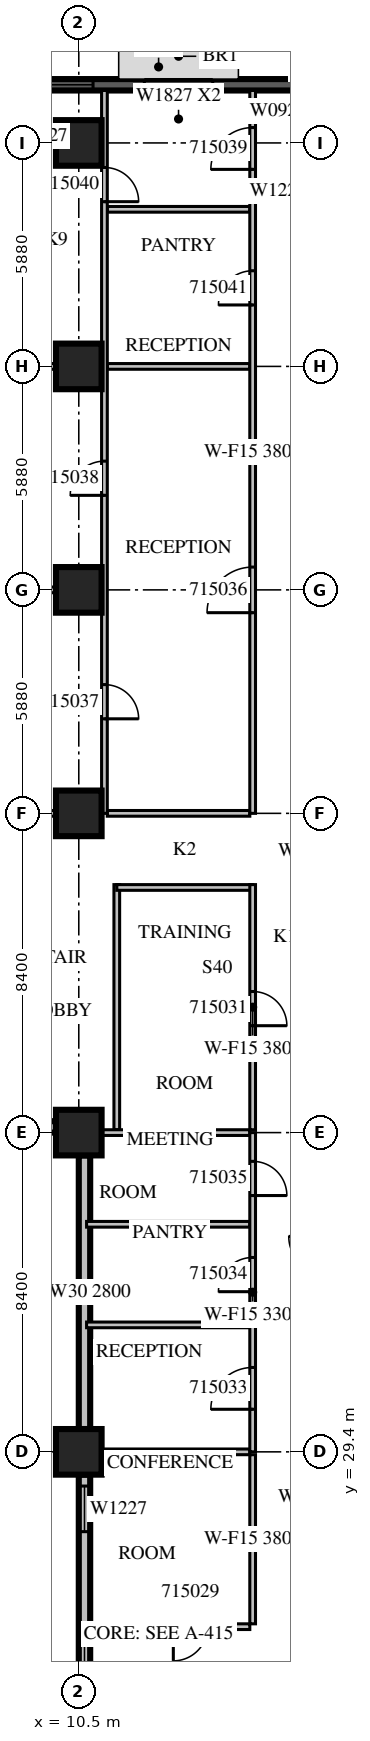
"""IFC4 building model, lengths in metres.
Left out: names, types, materials, properties, quantities, classifications, styles, units other than length and angle.
Written with IfcOpenShell. Run it as: python <this file> out.ifc"""

import sys

from ifc_helpers import new_model, si_unit, direction, frame, frame_2d, origin, origin_2d, place, context, subcontext, project, spatial, rectangle, extrude, source, transform, mapped, element, fill, save


model = new_model("IFC4")
c1 = context("Model", 3, precision=1e-05, world=origin(), true_north=direction((0.0, 1.0)))
c2 = subcontext(c1, "Body", "Model", "MODEL_VIEW")
j1 = project(units=[si_unit("LENGTHUNIT", "METRE"), si_unit("PLANEANGLEUNIT", "RADIAN")], contexts=[c1])
p1 = place(None, origin())
s1 = spatial("IfcSite", under=j1, at=p1, CompositionType="ELEMENT")
p2 = place(p1, origin())
s2 = spatial("IfcBuilding", under=s1, at=p2, CompositionType="ELEMENT")
p3 = place(p2, frame((0.0, 0.0, 74.1)))
s3 = spatial("IfcBuildingStorey", under=s2, at=p3, CompositionType="ELEMENT", Elevation=74.1)
m1 = source(origin(), c2, "Body", "SweptSolid", [
    extrude(rectangle(XDim=1.2, YDim=1.2, at=origin_2d()), origin(), (0.0, 0.0, 1.0), 4.2),
])
for number, where, z_axis, x_axis in (
    (1, (10.5, 29.4, 0.0), (0.0, 0.0, 1.0), (1.0, 0.0, 0.0)),
    (2, (10.5, 37.8, 0.0), (0.0, 0.0, 1.0), (1.0, 0.0, 0.0)),
    (3, (10.5, 46.2, 0.0), (0.0, 0.0, 1.0), (1.0, 0.0, 0.0)),
    (4, (10.5, 52.08, 0.0), (0.0, 0.0, 1.0), (1.0, 0.0, 0.0)),
    (5, (10.5, 57.96, 0.0), (0.0, 0.0, 1.0), (1.0, 0.0, 0.0)),
    (6, (10.5, 63.84, 0.0), (0.0, 0.0, 1.0), (1.0, 0.0, 0.0)),
):
    element("IfcColumn", number, at=place(p3, frame(where, z_axis=z_axis, x_axis=x_axis)), inside=s3, PredefinedType="COLUMN", context=c2, shape_type="MappedRepresentation", body=[
        mapped(m1, transform((0.0, 0.0, 0.0), scale=1.0)),
    ])
m2 = source(origin(), c2, "Body", "SweptSolid", [
    extrude(rectangle(XDim=8.4, YDim=0.3, at=frame_2d((4.2, 0.0))), origin(), (0.0, 0.0, 1.0), 3.8),
])
p4 = place(p3, frame((16.8, 65.37, 0.0), z_axis=(0.0, 0.0, 1.0), x_axis=(-1.0, 0.0, 0.0)))
e7 = element("IfcWall", 7, at=p4, inside=s3, PredefinedType="SOLIDWALL", context=c2, shape_type="MappedRepresentation", body=[
    mapped(m2, transform((0.0, 0.0, 0.0), scale=1.0)),
])
m3 = source(origin(), c2, "Body", "SweptSolid", [
    extrude(rectangle(XDim=1.8, YDim=2.7, at=frame_2d((0.9, 1.35))), frame((0.0, 0.16, 0.0), z_axis=(0.0, -1.0, 0.0), x_axis=(1.0, 0.0, 0.0)), (0.0, 0.0, 1.0), 0.32),
])
p5 = place(p4, frame((2.775, 0.0, 0.6)))
e8 = element("IfcOpeningElement", 8, at=p5, cuts=e7, PredefinedType="OPENING", context=c2, shape_type="MappedRepresentation", body=[
    mapped(m3, transform((0.0, 0.0, 0.0), scale=1.0)),
])
p6 = place(p4, frame((5.925, 0.0, 0.6)))
e9 = element("IfcOpeningElement", 9, at=p6, cuts=e7, PredefinedType="OPENING", context=c2, shape_type="MappedRepresentation", body=[
    mapped(m3, transform((0.0, 0.0, 0.0), scale=1.0)),
])
m4 = source(origin(), c2, "Body", "SweptSolid", [
    extrude(rectangle(XDim=8.7, YDim=0.3, at=frame_2d((4.35, 0.0))), origin(), (0.0, 0.0, 1.0), 3.8),
])
p7 = place(p3, frame((1.2, 37.95, 0.0), z_axis=(0.0, 0.0, 1.0), x_axis=(1.0, 0.0, 0.0)))
e10 = element("IfcWall", 10, at=p7, inside=s3, PredefinedType="STANDARD", context=c2, shape_type="MappedRepresentation", body=[
    mapped(m4, transform((0.0, 0.0, 0.0), scale=1.0)),
])
m5 = source(origin(), c2, "Body", "SweptSolid", [
    extrude(rectangle(XDim=2.4, YDim=2.7, at=frame_2d((1.2, 1.35))), frame((0.0, 0.16, 0.0), z_axis=(0.0, -1.0, 0.0), x_axis=(1.0, 0.0, 0.0)), (0.0, 0.0, 1.0), 0.32),
])
p8 = place(p7, frame((0.225, 0.0, 0.6)))
e11 = element("IfcOpeningElement", 11, at=p8, cuts=e10, PredefinedType="OPENING", context=c2, shape_type="MappedRepresentation", body=[
    mapped(m5, transform((0.0, 0.0, 0.0), scale=1.0)),
])
p9 = place(p7, frame((5.088, 0.0, 0.6)))
e12 = element("IfcOpeningElement", 12, at=p9, cuts=e10, PredefinedType="OPENING", context=c2, shape_type="MappedRepresentation", body=[
    mapped(m3, transform((0.0, 0.0, 0.0), scale=1.0)),
])
m6 = source(origin(), c2, "Body", "SweptSolid", [
    extrude(rectangle(XDim=7.2, YDim=0.3, at=frame_2d((3.6, 0.0))), origin(), (0.0, 0.0, 1.0), 2.8),
])
p10 = place(p3, frame((10.65, 37.2, 0.0), z_axis=(0.0, 0.0, 1.0), x_axis=(0.0, -1.0, 0.0)))
e13 = element("IfcWall", 13, at=p10, inside=s3, PredefinedType="STANDARD", context=c2, shape_type="MappedRepresentation", body=[
    mapped(m6, transform((0.0, 0.0, 0.0), scale=1.0)),
])
m7 = source(origin(), c2, "Body", "SweptSolid", [
    extrude(rectangle(XDim=6.6, YDim=0.3, at=frame_2d((3.3, 0.0))), origin(), (0.0, 0.0, 1.0), 3.8),
])
p11 = place(p3, frame((10.65, 28.8, 0.0), z_axis=(0.0, 0.0, 1.0), x_axis=(0.0, -1.0, 0.0)))
e14 = element("IfcWall", 14, at=p11, inside=s3, PredefinedType="STANDARD", context=c2, shape_type="MappedRepresentation", body=[
    mapped(m7, transform((0.0, 0.0, 0.0), scale=1.0)),
])
m8 = source(origin(), c2, "Body", "SweptSolid", [
    extrude(rectangle(XDim=1.2, YDim=2.7, at=frame_2d((0.6, 1.35))), frame((0.0, 0.16, 0.0), z_axis=(0.0, -1.0, 0.0), x_axis=(1.0, 0.0, 0.0)), (0.0, 0.0, 1.0), 0.32),
])
p12 = place(p11, frame((0.3, 0.0, 0.6)))
e15 = element("IfcOpeningElement", 15, at=p12, cuts=e14, PredefinedType="OPENING", context=c2, shape_type="MappedRepresentation", body=[
    mapped(m8, transform((0.0, 0.0, 0.0), scale=1.0)),
])
p13 = place(p11, frame((4.338, 0.0, 0.6)))
e16 = element("IfcOpeningElement", 16, at=p13, cuts=e14, PredefinedType="OPENING", context=c2, shape_type="MappedRepresentation", body=[
    mapped(m3, transform((0.0, 0.0, 0.0), scale=1.0)),
])
m9 = source(origin(), c2, "Body", "SweptSolid", [
    extrude(rectangle(XDim=4.295, YDim=0.15, at=frame_2d((2.147, 0.0))), origin(), (0.0, 0.0, 1.0), 3.8),
])
p14 = place(p3, frame((10.705, 24.8, 0.0), z_axis=(0.0, 0.0, 1.0), x_axis=(1.0, 0.0, 0.0)))
e17 = element("IfcWall", 17, at=p14, inside=s3, PredefinedType="PARTITIONING", context=c2, shape_type="MappedRepresentation", body=[
    mapped(m9, transform((0.0, 0.0, 0.0), scale=1.0)),
])
m10 = source(origin(), c2, "Body", "SweptSolid", [
    extrude(rectangle(XDim=0.9, YDim=2.1, at=frame_2d((0.45, 1.05))), frame((0.0, 0.085, 0.0), z_axis=(0.0, -1.0, 0.0), x_axis=(1.0, 0.0, 0.0)), (0.0, 0.0, 1.0), 0.17),
])
p15 = place(p14, frame((2.283, 0.0, 0.0)))
e18 = element("IfcOpeningElement", 18, at=p15, cuts=e17, PredefinedType="OPENING", context=c2, shape_type="MappedRepresentation", body=[
    mapped(m10, transform((0.0, 0.0, 0.0), scale=1.0)),
])
m11 = source(origin(), c2, "Body", "SweptSolid", [
    extrude(rectangle(XDim=4.45, YDim=0.15, at=frame_2d((2.225, 0.0))), origin(), (0.0, 0.0, 1.0), 3.8),
])
p16 = place(p3, frame((15.075, 24.875, 0.0), z_axis=(0.0, 0.0, 1.0), x_axis=(0.0, 1.0, 0.0)))
e19 = element("IfcWall", 19, at=p16, inside=s3, PredefinedType="PARTITIONING", context=c2, shape_type="MappedRepresentation", body=[
    mapped(m11, transform((0.0, 0.0, 0.0), scale=1.0)),
])
m12 = source(origin(), c2, "Body", "SweptSolid", [
    extrude(rectangle(XDim=3.901, YDim=0.15, at=frame_2d((1.95, 0.0))), origin(), (0.0, 0.0, 1.0), 3.8),
])
p17 = place(p3, frame((15.0, 29.4, 0.0), z_axis=(0.0, 0.0, 1.0), x_axis=(-1.0, 0.0, 0.0)))
e20 = element("IfcWall", 20, at=p17, inside=s3, PredefinedType="PARTITIONING", context=c2, shape_type="MappedRepresentation", body=[
    mapped(m12, transform((0.0, 0.0, 0.0), scale=1.0)),
])
m13 = source(origin(), c2, "Body", "SweptSolid", [
    extrude(rectangle(XDim=6.45, YDim=0.15, at=frame_2d((3.225, 0.0))), origin(), (0.0, 0.0, 1.0), 3.8),
])
p18 = place(p3, frame((11.5, 44.325, 0.0), z_axis=(0.0, 0.0, 1.0), x_axis=(0.0, -1.0, 0.0)))
e21 = element("IfcWall", 21, at=p18, inside=s3, PredefinedType="PARTITIONING", context=c2, shape_type="MappedRepresentation", body=[
    mapped(m13, transform((0.0, 0.0, 0.0), scale=1.0)),
])
m14 = source(origin(), c2, "Body", "SweptSolid", [
    extrude(rectangle(XDim=3.575, YDim=0.15, at=frame_2d((1.788, 0.0))), origin(), (0.0, 0.0, 1.0), 3.8),
])
p19 = place(p3, frame((15.075, 44.25, 0.0), z_axis=(0.0, 0.0, 1.0), x_axis=(-1.0, 0.0, 0.0)))
e22 = element("IfcWall", 22, at=p19, inside=s3, PredefinedType="PARTITIONING", context=c2, shape_type="MappedRepresentation", body=[
    mapped(m14, transform((0.0, 0.0, 0.0), scale=1.0)),
])
p20 = place(p3, frame((15.075, 37.875, 0.0), z_axis=(0.0, 0.0, 1.0), x_axis=(0.0, 1.0, 0.0)))
e23 = element("IfcWall", 23, at=p20, inside=s3, PredefinedType="PARTITIONING", context=c2, shape_type="MappedRepresentation", body=[
    mapped(m13, transform((0.0, 0.0, 0.0), scale=1.0)),
])
p21 = place(p20, frame((2.737, 0.0, 0.0)))
e24 = element("IfcOpeningElement", 24, at=p21, cuts=e23, PredefinedType="OPENING", context=c2, shape_type="MappedRepresentation", body=[
    mapped(m10, transform((0.0, 0.0, 0.0), scale=1.0)),
])
for number, where, z_axis, x_axis in (
    (25, (15.0, 32.74, 0.0), (0.0, 0.0, 1.0), (-1.0, 0.0, 0.0)),
    (26, (15.0, 35.388, 0.0), (0.0, 0.0, 1.0), (-1.0, 0.0, 0.0)),
):
    element("IfcWall", number, at=place(p3, frame(where, z_axis=z_axis, x_axis=x_axis)), inside=s3, PredefinedType="PARTITIONING", context=c2, shape_type="MappedRepresentation", body=[
        mapped(m9, transform((0.0, 0.0, 0.0), scale=1.0)),
    ])
p22 = place(p3, frame((15.0, 37.8, 0.0), z_axis=(0.0, 0.0, 1.0), x_axis=(-1.0, 0.0, 0.0)))
e27 = element("IfcWall", 27, at=p22, inside=s3, PredefinedType="PARTITIONING", context=c2, shape_type="MappedRepresentation", body=[
    mapped(m12, transform((0.0, 0.0, 0.0), scale=1.0)),
])
m15 = source(origin(), c2, "Body", "SweptSolid", [
    extrude(rectangle(XDim=8.702, YDim=0.15, at=frame_2d((4.351, 0.0))), origin(), (0.0, 0.0, 1.0), 3.8),
])
p23 = place(p3, frame((9.901, 52.08, 0.0), z_axis=(0.0, 0.0, 1.0), x_axis=(-1.0, 0.0, 0.0)))
e28 = element("IfcWall", 28, at=p23, inside=s3, PredefinedType="PARTITIONING", context=c2, shape_type="MappedRepresentation", body=[
    mapped(m15, transform((0.0, 0.0, 0.0), scale=1.0)),
])
m16 = source(origin(), c2, "Body", "SweptSolid", [
    extrude(rectangle(XDim=3.75, YDim=0.15, at=frame_2d((1.875, 0.0))), origin(), (0.0, 0.0, 1.0), 3.8),
])
p24 = place(p3, frame((15.0, 62.093, 0.0), z_axis=(0.0, 0.0, 1.0), x_axis=(-1.0, 0.0, 0.0)))
e29 = element("IfcWall", 29, at=p24, inside=s3, PredefinedType="PARTITIONING", context=c2, shape_type="MappedRepresentation", body=[
    mapped(m16, transform((0.0, 0.0, 0.0), scale=1.0)),
])
p25 = place(p3, frame((9.901, 46.2, 0.0), z_axis=(0.0, 0.0, 1.0), x_axis=(-1.0, 0.0, 0.0)))
e30 = element("IfcWall", 30, at=p25, inside=s3, PredefinedType="PARTITIONING", context=c2, shape_type="MappedRepresentation", body=[
    mapped(m15, transform((0.0, 0.0, 0.0), scale=1.0)),
])
p26 = place(p3, frame((15.0, 46.2, 0.0), z_axis=(0.0, 0.0, 1.0), x_axis=(-1.0, 0.0, 0.0)))
e31 = element("IfcWall", 31, at=p26, inside=s3, PredefinedType="PARTITIONING", context=c2, shape_type="MappedRepresentation", body=[
    mapped(m16, transform((0.0, 0.0, 0.0), scale=1.0)),
])
p27 = place(p3, frame((9.901, 57.96, 0.0), z_axis=(0.0, 0.0, 1.0), x_axis=(-1.0, 0.0, 0.0)))
e32 = element("IfcWall", 32, at=p27, inside=s3, PredefinedType="PARTITIONING", context=c2, shape_type="MappedRepresentation", body=[
    mapped(m15, transform((0.0, 0.0, 0.0), scale=1.0)),
])
p28 = place(p3, frame((15.0, 57.96, 0.0), z_axis=(0.0, 0.0, 1.0), x_axis=(-1.0, 0.0, 0.0)))
e33 = element("IfcWall", 33, at=p28, inside=s3, PredefinedType="PARTITIONING", context=c2, shape_type="MappedRepresentation", body=[
    mapped(m16, transform((0.0, 0.0, 0.0), scale=1.0)),
])
m17 = source(origin(), c2, "Body", "SweptSolid", [
    extrude(rectangle(XDim=19.02, YDim=0.15, at=frame_2d((9.51, 0.0))), origin(), (0.0, 0.0, 1.0), 3.8),
])
p29 = place(p3, frame((11.175, 46.2, 0.0), z_axis=(0.0, 0.0, 1.0), x_axis=(0.0, 1.0, 0.0)))
e34 = element("IfcWall", 34, at=p29, inside=s3, PredefinedType="PARTITIONING", context=c2, shape_type="MappedRepresentation", body=[
    mapped(m17, transform((0.0, 0.0, 0.0), scale=1.0)),
])
p30 = place(p29, frame((2.487, 0.0, 0.0)))
e35 = element("IfcOpeningElement", 35, at=p30, cuts=e34, PredefinedType="OPENING", context=c2, shape_type="MappedRepresentation", body=[
    mapped(m10, transform((0.0, 0.0, 0.0), scale=1.0)),
])
p31 = place(p29, frame((8.367, 0.0, 0.0)))
e36 = element("IfcOpeningElement", 36, at=p31, cuts=e34, PredefinedType="OPENING", context=c2, shape_type="MappedRepresentation", body=[
    mapped(m10, transform((0.0, 0.0, 0.0), scale=1.0)),
])
p32 = place(p29, frame((16.094, 0.0, 0.0)))
e37 = element("IfcOpeningElement", 37, at=p32, cuts=e34, PredefinedType="OPENING", context=c2, shape_type="MappedRepresentation", body=[
    mapped(m10, transform((0.0, 0.0, 0.0), scale=1.0)),
])
m18 = source(origin(), c2, "Body", "SweptSolid", [
    extrude(rectangle(XDim=8.4, YDim=0.15, at=frame_2d((4.2, 0.0))), origin(), (0.0, 0.0, 1.0), 3.3),
])
p33 = place(p3, frame((15.075, 29.4, 0.0), z_axis=(0.0, 0.0, 1.0), x_axis=(0.0, 1.0, 0.0)))
e38 = element("IfcWall", 38, at=p33, inside=s3, PredefinedType="PARTITIONING", context=c2, shape_type="MappedRepresentation", body=[
    mapped(m18, transform((0.0, 0.0, 0.0), scale=1.0)),
])
m19 = source(origin(), c2, "Body", "SweptSolid", [
    extrude(rectangle(XDim=1.1, YDim=2.1, at=frame_2d((0.55, 1.05))), frame((0.0, 0.085, 0.0), z_axis=(0.0, -1.0, 0.0), x_axis=(1.0, 0.0, 0.0)), (0.0, 0.0, 1.0), 0.17),
])
p34 = place(p33, frame((1.12, 0.0, 0.0)))
e39 = element("IfcOpeningElement", 39, at=p34, cuts=e38, PredefinedType="OPENING", context=c2, shape_type="MappedRepresentation", body=[
    mapped(m19, transform((0.0, 0.0, 0.0), scale=1.0)),
])
p35 = place(p33, frame((4.214, 0.0, 0.0)))
e40 = element("IfcOpeningElement", 40, at=p35, cuts=e38, PredefinedType="OPENING", context=c2, shape_type="MappedRepresentation", body=[
    mapped(m10, transform((0.0, 0.0, 0.0), scale=1.0)),
])
p36 = place(p33, frame((6.744, 0.0, 0.0)))
e41 = element("IfcOpeningElement", 41, at=p36, cuts=e38, PredefinedType="OPENING", context=c2, shape_type="MappedRepresentation", body=[
    mapped(m10, transform((0.0, 0.0, 0.0), scale=1.0)),
])
p37 = place(p3, frame((15.075, 46.2, 0.0), z_axis=(0.0, 0.0, 1.0), x_axis=(0.0, 1.0, 0.0)))
e42 = element("IfcWall", 42, at=p37, inside=s3, PredefinedType="PARTITIONING", context=c2, shape_type="MappedRepresentation", body=[
    mapped(m17, transform((0.0, 0.0, 0.0), scale=1.0)),
])
m20 = source(origin(), c2, "Body", "SweptSolid", [
    extrude(rectangle(XDim=1.2, YDim=2.1, at=frame_2d((0.6, 1.05))), frame((0.0, 0.085, 0.0), z_axis=(0.0, -1.0, 0.0), x_axis=(1.0, 0.0, 0.0)), (0.0, 0.0, 1.0), 0.17),
])
p38 = place(p37, frame((5.28, 0.0, 0.0)))
e43 = element("IfcOpeningElement", 43, at=p38, cuts=e42, PredefinedType="OPENING", context=c2, shape_type="MappedRepresentation", body=[
    mapped(m20, transform((0.0, 0.0, 0.0), scale=1.0)),
])
p39 = place(p37, frame((16.944, 0.0, 0.0)))
e44 = element("IfcOpeningElement", 44, at=p39, cuts=e42, PredefinedType="OPENING", context=c2, shape_type="MappedRepresentation", body=[
    mapped(m19, transform((0.0, 0.0, 0.0), scale=1.0)),
])
p40 = place(p37, frame((13.377, 0.0, 0.0)))
e45 = element("IfcOpeningElement", 45, at=p40, cuts=e42, PredefinedType="OPENING", context=c2, shape_type="MappedRepresentation", body=[
    mapped(m10, transform((0.0, 0.0, 0.0), scale=1.0)),
])
m21 = source(origin(), c2, "Body", "SweptSolid", [
    extrude(rectangle(XDim=1.8, YDim=2.7, at=frame_2d((0.9, 1.35))), frame((0.0, 0.03, 0.0), z_axis=(0.0, -1.0, 0.0), x_axis=(1.0, 0.0, 0.0)), (0.0, 0.0, 1.0), 0.06),
])
p41 = place(p5, origin())
e46 = element("IfcWindow", 46, at=p41, inside=s3, PartitioningType="SINGLE_PANEL", PredefinedType="WINDOW", context=c2, shape_type="MappedRepresentation", body=[
    mapped(m21, transform((0.0, 0.0, 0.0), scale=1.0)),
])
fill(e8, e46)
p42 = place(p6, origin())
e47 = element("IfcWindow", 47, at=p42, inside=s3, PartitioningType="SINGLE_PANEL", PredefinedType="WINDOW", context=c2, shape_type="MappedRepresentation", body=[
    mapped(m21, transform((0.0, 0.0, 0.0), scale=1.0)),
])
fill(e9, e47)
m22 = source(origin(), c2, "Body", "SweptSolid", [
    extrude(rectangle(XDim=1.2, YDim=2.7, at=frame_2d((0.6, 1.35))), frame((0.0, 0.03, 0.0), z_axis=(0.0, -1.0, 0.0), x_axis=(1.0, 0.0, 0.0)), (0.0, 0.0, 1.0), 0.06),
])
p43 = place(p12, origin())
e48 = element("IfcWindow", 48, at=p43, inside=s3, PartitioningType="SINGLE_PANEL", PredefinedType="WINDOW", context=c2, shape_type="MappedRepresentation", body=[
    mapped(m22, transform((0.0, 0.0, 0.0), scale=1.0)),
])
fill(e15, e48)
p44 = place(p13, origin())
e49 = element("IfcWindow", 49, at=p44, inside=s3, PartitioningType="SINGLE_PANEL", PredefinedType="WINDOW", context=c2, shape_type="MappedRepresentation", body=[
    mapped(m21, transform((0.0, 0.0, 0.0), scale=1.0)),
])
fill(e16, e49)
m23 = source(origin(), c2, "Body", "SweptSolid", [
    extrude(rectangle(XDim=0.9, YDim=2.1, at=frame_2d((0.45, 1.05))), frame((0.0, 0.025, 0.0), z_axis=(0.0, -1.0, 0.0), x_axis=(1.0, 0.0, 0.0)), (0.0, 0.0, 1.0), 0.05),
])
p45 = place(p15, origin())
e50 = element("IfcDoor", 50, at=p45, inside=s3, OperationType="SINGLE_SWING_RIGHT", PredefinedType="DOOR", context=c2, shape_type="MappedRepresentation", body=[
    mapped(m23, transform((0.0, 0.0, 0.0), scale=1.0)),
])
fill(e18, e50)
p46 = place(p21, origin())
e51 = element("IfcDoor", 51, at=p46, inside=s3, OperationType="SINGLE_SWING_RIGHT", PredefinedType="DOOR", context=c2, shape_type="MappedRepresentation", body=[
    mapped(m23, transform((0.0, 0.0, 0.0), scale=1.0)),
])
fill(e24, e51)
m24 = source(origin(), c2, "Body", "SweptSolid", [
    extrude(rectangle(XDim=1.1, YDim=2.1, at=frame_2d((0.55, 1.05))), frame((0.0, 0.025, 0.0), z_axis=(0.0, -1.0, 0.0), x_axis=(1.0, 0.0, 0.0)), (0.0, 0.0, 1.0), 0.05),
])
p47 = place(p34, origin())
e52 = element("IfcDoor", 52, at=p47, inside=s3, OperationType="SINGLE_SWING_LEFT", PredefinedType="DOOR", context=c2, shape_type="MappedRepresentation", body=[
    mapped(m24, transform((0.0, 0.0, 0.0), scale=1.0)),
])
fill(e39, e52)
p48 = place(p35, origin())
e53 = element("IfcDoor", 53, at=p48, inside=s3, OperationType="SINGLE_SWING_LEFT", PredefinedType="DOOR", context=c2, shape_type="MappedRepresentation", body=[
    mapped(m23, transform((0.0, 0.0, 0.0), scale=1.0)),
])
fill(e40, e53)
p49 = place(p36, origin())
e54 = element("IfcDoor", 54, at=p49, inside=s3, OperationType="SINGLE_SWING_RIGHT", PredefinedType="DOOR", context=c2, shape_type="MappedRepresentation", body=[
    mapped(m23, transform((0.0, 0.0, 0.0), scale=1.0)),
])
fill(e41, e54)
m25 = source(origin(), c2, "Body", "SweptSolid", [
    extrude(rectangle(XDim=1.2, YDim=2.1, at=frame_2d((0.6, 1.05))), frame((0.0, 0.025, 0.0), z_axis=(0.0, -1.0, 0.0), x_axis=(1.0, 0.0, 0.0)), (0.0, 0.0, 1.0), 0.05),
])
p50 = place(p38, origin())
e55 = element("IfcDoor", 55, at=p50, inside=s3, OperationType="SINGLE_SWING_LEFT", PredefinedType="DOOR", context=c2, shape_type="MappedRepresentation", body=[
    mapped(m25, transform((0.0, 0.0, 0.0), scale=1.0)),
])
fill(e43, e55)
p51 = place(p30, origin())
e56 = element("IfcDoor", 56, at=p51, inside=s3, OperationType="SINGLE_SWING_RIGHT", PredefinedType="DOOR", context=c2, shape_type="MappedRepresentation", body=[
    mapped(m23, transform((0.0, 0.0, 0.0), scale=1.0)),
])
fill(e35, e56)
p52 = place(p31, origin())
e57 = element("IfcDoor", 57, at=p52, inside=s3, OperationType="SINGLE_SWING_LEFT", PredefinedType="DOOR", context=c2, shape_type="MappedRepresentation", body=[
    mapped(m23, transform((0.0, 0.0, 0.0), scale=1.0)),
])
fill(e36, e57)
p53 = place(p39, origin())
e58 = element("IfcDoor", 58, at=p53, inside=s3, OperationType="SINGLE_SWING_LEFT", PredefinedType="DOOR", context=c2, shape_type="MappedRepresentation", body=[
    mapped(m24, transform((0.0, 0.0, 0.0), scale=1.0)),
])
fill(e44, e58)
p54 = place(p32, origin())
e59 = element("IfcDoor", 59, at=p54, inside=s3, OperationType="SINGLE_SWING_RIGHT", PredefinedType="DOOR", context=c2, shape_type="MappedRepresentation", body=[
    mapped(m23, transform((0.0, 0.0, 0.0), scale=1.0)),
])
fill(e37, e59)
p55 = place(p40, origin())
e60 = element("IfcDoor", 60, at=p55, inside=s3, OperationType="SINGLE_SWING_LEFT", PredefinedType="DOOR", context=c2, shape_type="MappedRepresentation", body=[
    mapped(m23, transform((0.0, 0.0, 0.0), scale=1.0)),
])
fill(e45, e60)
save(model, sys.argv[1])
